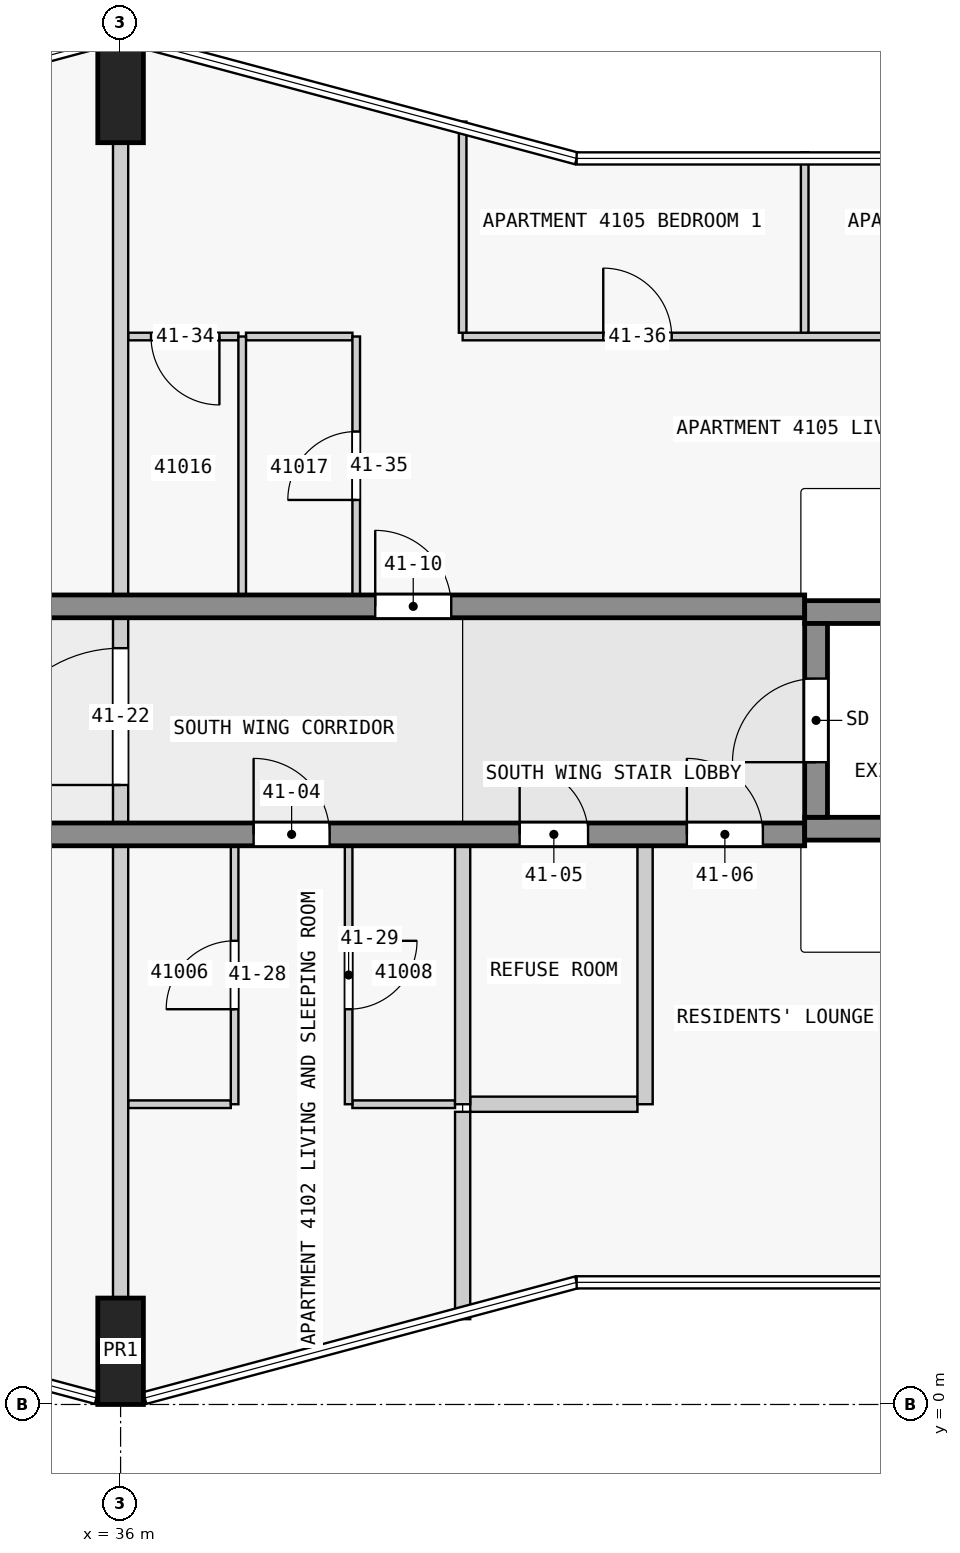
"""IFC4 building model, lengths in metres.
Left out: names, types, materials, properties, quantities, classifications, styles, units other than length and angle.
Written with IfcOpenShell. Run it as: python <this file> out.ifc"""

import sys

from ifc_helpers import new_model, si_unit, direction, frame, frame_2d, origin, origin_2d, place, context, subcontext, project, spatial, rectangle, extrude, element, fill, save


model = new_model("IFC4")
c1 = context("Model", 3, precision=1e-05, world=origin(), true_north=direction((0.0, 1.0)))
c2 = subcontext(c1, "Body", "Model", "MODEL_VIEW")
j1 = project(units=[si_unit("LENGTHUNIT", "METRE"), si_unit("PLANEANGLEUNIT", "RADIAN")], contexts=[c1])
p1 = place(None, origin())
s1 = spatial("IfcSite", under=j1, at=p1, CompositionType="ELEMENT")
p2 = place(p1, origin())
s2 = spatial("IfcBuilding", under=s1, at=p2, CompositionType="ELEMENT")
p3 = place(p2, frame((0.0, 0.0, 160.4)))
s3 = spatial("IfcBuildingStorey", under=s2, at=p3, CompositionType="ELEMENT", Elevation=160.4)
for number, where, z_axis, x_axis in (
    (1, (36.0, 0.7, 0.0), (0.0, 0.0, 1.0), (1.0, 0.0, 0.0)),
    (2, (36.0, 17.3, 0.0), (0.0, 0.0, 1.0), (1.0, 0.0, 0.0)),
):
    element("IfcColumn", number, at=place(p3, frame(where, z_axis=z_axis, x_axis=x_axis)), inside=s3, PredefinedType="COLUMN", context=c2, shape_type="SweptSolid", body=[
        extrude(rectangle(XDim=0.6, YDim=1.4, at=origin_2d()), origin(), (0.0, 0.0, 1.0), 3.5),
    ])
p4 = place(p3, frame((45.15, 7.725, 0.0), z_axis=(0.0, 0.0, 1.0), x_axis=(0.0, 1.0, 0.0)))
e3 = element("IfcWall", 3, at=p4, inside=s3, PredefinedType="SHEAR", context=c2, shape_type="SweptSolid", body=[
    extrude(rectangle(XDim=2.55, YDim=0.3, at=frame_2d((1.275, 0.0))), origin(), (0.0, 0.0, 1.0), 3.5),
])
p5 = place(p4, frame((0.725, 0.0, 0.0)))
e4 = element("IfcOpeningElement", 4, at=p5, cuts=e3, PredefinedType="OPENING", context=c2, shape_type="SweptSolid", body=[
    extrude(rectangle(XDim=1.1, YDim=2.1, at=frame_2d((0.55, 1.05))), frame((0.0, 0.16, 0.0), z_axis=(0.0, -1.0, 0.0), x_axis=(1.0, 0.0, 0.0)), (0.0, 0.0, 1.0), 0.32),
])
for number, where, z_axis, x_axis in (
    (5, (45.0, 7.575, 0.0), (0.0, 0.0, 1.0), (1.0, 0.0, 0.0)),
    (6, (45.0, 10.425, 0.0), (0.0, 0.0, 1.0), (1.0, 0.0, 0.0)),
):
    element("IfcWall", number, at=place(p3, frame(where, z_axis=z_axis, x_axis=x_axis)), inside=s3, PredefinedType="SHEAR", context=c2, shape_type="SweptSolid", body=[
        extrude(rectangle(XDim=7.2, YDim=0.3, at=frame_2d((3.6, 0.0))), origin(), (0.0, 0.0, 1.0), 3.5),
    ])
p6 = place(p3, frame((22.5, 7.5, 0.0), z_axis=(0.0, 0.0, 1.0), x_axis=(1.0, 0.0, 0.0)))
e7 = element("IfcWall", 7, at=p6, inside=s3, PredefinedType="SHEAR", context=c2, shape_type="SweptSolid", body=[
    extrude(rectangle(XDim=22.5, YDim=0.3, at=frame_2d((11.25, 0.0))), origin(), (0.0, 0.0, 1.0), 3.25),
])
p7 = place(p6, frame((1.75, 0.0, 0.0)))
e8 = element("IfcOpeningElement", 8, at=p7, cuts=e7, PredefinedType="OPENING", context=c2, shape_type="SweptSolid", body=[
    extrude(rectangle(XDim=1.0, YDim=2.1, at=frame_2d((0.5, 1.05))), frame((0.0, 0.16, 0.0), z_axis=(0.0, -1.0, 0.0), x_axis=(1.0, 0.0, 0.0)), (0.0, 0.0, 1.0), 0.32),
])
p8 = place(p6, frame((6.25, 0.0, 0.0)))
e9 = element("IfcOpeningElement", 9, at=p8, cuts=e7, PredefinedType="OPENING", context=c2, shape_type="SweptSolid", body=[
    extrude(rectangle(XDim=1.0, YDim=2.1, at=frame_2d((0.5, 1.05))), frame((0.0, 0.16, 0.0), z_axis=(0.0, -1.0, 0.0), x_axis=(1.0, 0.0, 0.0)), (0.0, 0.0, 1.0), 0.32),
])
p9 = place(p6, frame((10.75, 0.0, 0.0)))
e10 = element("IfcOpeningElement", 10, at=p9, cuts=e7, PredefinedType="OPENING", context=c2, shape_type="SweptSolid", body=[
    extrude(rectangle(XDim=1.0, YDim=2.1, at=frame_2d((0.5, 1.05))), frame((0.0, 0.16, 0.0), z_axis=(0.0, -1.0, 0.0), x_axis=(1.0, 0.0, 0.0)), (0.0, 0.0, 1.0), 0.32),
])
p10 = place(p6, frame((15.25, 0.0, 0.0)))
e11 = element("IfcOpeningElement", 11, at=p10, cuts=e7, PredefinedType="OPENING", context=c2, shape_type="SweptSolid", body=[
    extrude(rectangle(XDim=1.0, YDim=2.1, at=frame_2d((0.5, 1.05))), frame((0.0, 0.16, 0.0), z_axis=(0.0, -1.0, 0.0), x_axis=(1.0, 0.0, 0.0)), (0.0, 0.0, 1.0), 0.32),
])
p11 = place(p6, frame((18.75, 0.0, 0.0)))
e12 = element("IfcOpeningElement", 12, at=p11, cuts=e7, PredefinedType="OPENING", context=c2, shape_type="SweptSolid", body=[
    extrude(rectangle(XDim=0.9, YDim=2.1, at=frame_2d((0.45, 1.05))), frame((0.0, 0.16, 0.0), z_axis=(0.0, -1.0, 0.0), x_axis=(1.0, 0.0, 0.0)), (0.0, 0.0, 1.0), 0.32),
])
p12 = place(p6, frame((20.95, 0.0, 0.0)))
e13 = element("IfcOpeningElement", 13, at=p12, cuts=e7, PredefinedType="OPENING", context=c2, shape_type="SweptSolid", body=[
    extrude(rectangle(XDim=1.0, YDim=2.1, at=frame_2d((0.5, 1.05))), frame((0.0, 0.16, 0.0), z_axis=(0.0, -1.0, 0.0), x_axis=(1.0, 0.0, 0.0)), (0.0, 0.0, 1.0), 0.32),
])
p13 = place(p3, frame((22.5, 10.5, 0.0), z_axis=(0.0, 0.0, 1.0), x_axis=(1.0, 0.0, 0.0)))
e14 = element("IfcWall", 14, at=p13, inside=s3, PredefinedType="SHEAR", context=c2, shape_type="SweptSolid", body=[
    extrude(rectangle(XDim=22.5, YDim=0.3, at=frame_2d((11.25, 0.0))), origin(), (0.0, 0.0, 1.0), 3.25),
])
p14 = place(p13, frame((1.75, 0.0, 0.0)))
e15 = element("IfcOpeningElement", 15, at=p14, cuts=e14, PredefinedType="OPENING", context=c2, shape_type="SweptSolid", body=[
    extrude(rectangle(XDim=1.0, YDim=2.1, at=frame_2d((0.5, 1.05))), frame((0.0, 0.16, 0.0), z_axis=(0.0, -1.0, 0.0), x_axis=(1.0, 0.0, 0.0)), (0.0, 0.0, 1.0), 0.32),
])
p15 = place(p13, frame((6.25, 0.0, 0.0)))
e16 = element("IfcOpeningElement", 16, at=p15, cuts=e14, PredefinedType="OPENING", context=c2, shape_type="SweptSolid", body=[
    extrude(rectangle(XDim=1.0, YDim=2.1, at=frame_2d((0.5, 1.05))), frame((0.0, 0.16, 0.0), z_axis=(0.0, -1.0, 0.0), x_axis=(1.0, 0.0, 0.0)), (0.0, 0.0, 1.0), 0.32),
])
p16 = place(p13, frame((10.35, 0.0, 0.0)))
e17 = element("IfcOpeningElement", 17, at=p16, cuts=e14, PredefinedType="OPENING", context=c2, shape_type="SweptSolid", body=[
    extrude(rectangle(XDim=1.8, YDim=2.1, at=frame_2d((0.9, 1.05))), frame((0.0, 0.16, 0.0), z_axis=(0.0, -1.0, 0.0), x_axis=(1.0, 0.0, 0.0)), (0.0, 0.0, 1.0), 0.32),
])
p17 = place(p13, frame((16.85, 0.0, 0.0)))
e18 = element("IfcOpeningElement", 18, at=p17, cuts=e14, PredefinedType="OPENING", context=c2, shape_type="SweptSolid", body=[
    extrude(rectangle(XDim=1.0, YDim=2.1, at=frame_2d((0.5, 1.05))), frame((0.0, 0.16, 0.0), z_axis=(0.0, -1.0, 0.0), x_axis=(1.0, 0.0, 0.0)), (0.0, 0.0, 1.0), 0.32),
])
for number, where, z_axis, x_axis in (
    (19, (36.1, 3.95, 0.0), (0.0, 0.0, 1.0), (1.0, 0.0, 0.0)),
    (20, (39.05, 3.95, 0.0), (0.0, 0.0, 1.0), (1.0, 0.0, 0.0)),
):
    element("IfcWall", number, at=place(p3, frame(where, z_axis=z_axis, x_axis=x_axis)), inside=s3, PredefinedType="PARTITIONING", context=c2, shape_type="SweptSolid", body=[
        extrude(rectangle(XDim=1.35, YDim=0.1, at=frame_2d((0.675, 0.0))), origin(), (0.0, 0.0, 1.0), 3.25),
    ])
p18 = place(p3, frame((40.6, 3.95, 0.0), z_axis=(0.0, 0.0, 1.0), x_axis=(1.0, 0.0, 0.0)))
e21 = element("IfcWall", 21, at=p18, inside=s3, PredefinedType="PARTITIONING", context=c2, shape_type="SweptSolid", body=[
    extrude(rectangle(XDim=2.2, YDim=0.2, at=frame_2d((1.1, 0.0))), origin(), (0.0, 0.0, 1.0), 3.25),
])
p19 = place(p3, frame((37.55, 14.05, 0.0), z_axis=(0.0, 0.0, 1.0), x_axis=(-1.0, 0.0, 0.0)))
e22 = element("IfcWall", 22, at=p19, inside=s3, PredefinedType="PARTITIONING", context=c2, shape_type="SweptSolid", body=[
    extrude(rectangle(XDim=1.45, YDim=0.1, at=frame_2d((0.725, 0.0))), origin(), (0.0, 0.0, 1.0), 3.25),
])
p20 = place(p19, frame((0.25, 0.0, 0.0)))
e23 = element("IfcOpeningElement", 23, at=p20, cuts=e22, PredefinedType="OPENING", context=c2, shape_type="SweptSolid", body=[
    extrude(rectangle(XDim=0.9, YDim=2.1, at=frame_2d((0.45, 1.05))), frame((0.0, 0.06, 0.0), z_axis=(0.0, -1.0, 0.0), x_axis=(1.0, 0.0, 0.0)), (0.0, 0.0, 1.0), 0.12),
])
p21 = place(p3, frame((39.05, 14.05, 0.0), z_axis=(0.0, 0.0, 1.0), x_axis=(-1.0, 0.0, 0.0)))
e24 = element("IfcWall", 24, at=p21, inside=s3, PredefinedType="PARTITIONING", context=c2, shape_type="SweptSolid", body=[
    extrude(rectangle(XDim=1.4, YDim=0.1, at=frame_2d((0.7, 0.0))), origin(), (0.0, 0.0, 1.0), 3.25),
])
p22 = place(p3, frame((40.5, 14.05, 0.0), z_axis=(0.0, 0.0, 1.0), x_axis=(1.0, 0.0, 0.0)))
e25 = element("IfcWall", 25, at=p22, inside=s3, PredefinedType="PARTITIONING", context=c2, shape_type="SweptSolid", body=[
    extrude(rectangle(XDim=13.58, YDim=0.1, at=frame_2d((6.79, 0.0))), origin(), (0.0, 0.0, 1.0), 3.25),
])
p23 = place(p22, frame((1.85, 0.0, 0.0)))
e26 = element("IfcOpeningElement", 26, at=p23, cuts=e25, PredefinedType="OPENING", context=c2, shape_type="SweptSolid", body=[
    extrude(rectangle(XDim=0.9, YDim=2.1, at=frame_2d((0.45, 1.05))), frame((0.0, 0.06, 0.0), z_axis=(0.0, -1.0, 0.0), x_axis=(1.0, 0.0, 0.0)), (0.0, 0.0, 1.0), 0.12),
])
p24 = place(p22, frame((6.35, 0.0, 0.0)))
e27 = element("IfcOpeningElement", 27, at=p24, cuts=e25, PredefinedType="OPENING", context=c2, shape_type="SweptSolid", body=[
    extrude(rectangle(XDim=0.9, YDim=2.1, at=frame_2d((0.45, 1.05))), frame((0.0, 0.06, 0.0), z_axis=(0.0, -1.0, 0.0), x_axis=(1.0, 0.0, 0.0)), (0.0, 0.0, 1.0), 0.12),
])
p25 = place(p22, frame((10.65, 0.0, 0.0)))
e28 = element("IfcOpeningElement", 28, at=p25, cuts=e25, PredefinedType="OPENING", context=c2, shape_type="SweptSolid", body=[
    extrude(rectangle(XDim=0.9, YDim=2.1, at=frame_2d((0.45, 1.05))), frame((0.0, 0.06, 0.0), z_axis=(0.0, -1.0, 0.0), x_axis=(1.0, 0.0, 0.0)), (0.0, 0.0, 1.0), 0.12),
])
for number, where, z_axis, x_axis in (
    (29, (36.0, 1.4, 0.0), (0.0, 0.0, 1.0), (0.0, 1.0, 0.0)),
    (30, (36.0, 10.65, 0.0), (0.0, 0.0, 1.0), (0.0, 1.0, 0.0)),
):
    element("IfcWall", number, at=place(p3, frame(where, z_axis=z_axis, x_axis=x_axis)), inside=s3, PredefinedType="PARTITIONING", context=c2, shape_type="SweptSolid", body=[
        extrude(rectangle(XDim=5.95, YDim=0.2, at=frame_2d((2.975, 0.0))), origin(), (0.0, 0.0, 1.0), 3.25),
    ])
p26 = place(p3, frame((37.5, 3.95, 0.0), z_axis=(0.0, 0.0, 1.0), x_axis=(0.0, 1.0, 0.0)))
e31 = element("IfcWall", 31, at=p26, inside=s3, PredefinedType="PARTITIONING", context=c2, shape_type="SweptSolid", body=[
    extrude(rectangle(XDim=3.4, YDim=0.1, at=frame_2d((1.7, 0.0))), origin(), (0.0, 0.0, 1.0), 3.25),
])
p27 = place(p26, frame((1.25, 0.0, 0.0)))
e32 = element("IfcOpeningElement", 32, at=p27, cuts=e31, PredefinedType="OPENING", context=c2, shape_type="SweptSolid", body=[
    extrude(rectangle(XDim=0.9, YDim=2.1, at=frame_2d((0.45, 1.05))), frame((0.0, 0.06, 0.0), z_axis=(0.0, -1.0, 0.0), x_axis=(1.0, 0.0, 0.0)), (0.0, 0.0, 1.0), 0.12),
])
p28 = place(p3, frame((37.6, 10.65, 0.0), z_axis=(0.0, 0.0, 1.0), x_axis=(0.0, 1.0, 0.0)))
e33 = element("IfcWall", 33, at=p28, inside=s3, PredefinedType="PARTITIONING", context=c2, shape_type="SweptSolid", body=[
    extrude(rectangle(XDim=3.4, YDim=0.1, at=frame_2d((1.7, 0.0))), origin(), (0.0, 0.0, 1.0), 3.25),
])
p29 = place(p3, frame((39.0, 7.35, 0.0), z_axis=(0.0, 0.0, 1.0), x_axis=(0.0, -1.0, 0.0)))
e34 = element("IfcWall", 34, at=p29, inside=s3, PredefinedType="PARTITIONING", context=c2, shape_type="SweptSolid", body=[
    extrude(rectangle(XDim=3.4, YDim=0.1, at=frame_2d((1.7, 0.0))), origin(), (0.0, 0.0, 1.0), 3.25),
])
p30 = place(p29, frame((1.25, 0.0, 0.0)))
e35 = element("IfcOpeningElement", 35, at=p30, cuts=e34, PredefinedType="OPENING", context=c2, shape_type="SweptSolid", body=[
    extrude(rectangle(XDim=0.9, YDim=2.1, at=frame_2d((0.45, 1.05))), frame((0.0, 0.06, 0.0), z_axis=(0.0, -1.0, 0.0), x_axis=(1.0, 0.0, 0.0)), (0.0, 0.0, 1.0), 0.12),
])
p31 = place(p3, frame((39.1, 10.65, 0.0), z_axis=(0.0, 0.0, 1.0), x_axis=(0.0, 1.0, 0.0)))
e36 = element("IfcWall", 36, at=p31, inside=s3, PredefinedType="PARTITIONING", context=c2, shape_type="SweptSolid", body=[
    extrude(rectangle(XDim=3.4, YDim=0.1, at=frame_2d((1.7, 0.0))), origin(), (0.0, 0.0, 1.0), 3.25),
])
p32 = place(p31, frame((1.25, 0.0, 0.0)))
e37 = element("IfcOpeningElement", 37, at=p32, cuts=e36, PredefinedType="OPENING", context=c2, shape_type="SweptSolid", body=[
    extrude(rectangle(XDim=0.9, YDim=2.1, at=frame_2d((0.45, 1.05))), frame((0.0, 0.06, 0.0), z_axis=(0.0, -1.0, 0.0), x_axis=(1.0, 0.0, 0.0)), (0.0, 0.0, 1.0), 0.12),
])
p33 = place(p3, frame((40.5, 16.878, 0.0), z_axis=(0.0, 0.0, 1.0), x_axis=(0.0, -1.0, 0.0)))
e38 = element("IfcWall", 38, at=p33, inside=s3, PredefinedType="PARTITIONING", context=c2, shape_type="SweptSolid", body=[
    extrude(rectangle(XDim=2.778, YDim=0.1, at=frame_2d((1.389, 0.0))), origin(), (0.0, 0.0, 1.0), 3.25),
])
p34 = place(p3, frame((40.5, 3.85, 0.0), z_axis=(0.0, 0.0, 1.0), x_axis=(0.0, -1.0, 0.0)))
e39 = element("IfcWall", 39, at=p34, inside=s3, PredefinedType="PARTITIONING", context=c2, shape_type="SweptSolid", body=[
    extrude(rectangle(XDim=2.728, YDim=0.2, at=frame_2d((1.364, 0.0))), origin(), (0.0, 0.0, 1.0), 3.25),
])
for number, where, z_axis, x_axis in (
    (40, (40.5, 3.95, 0.0), (0.0, 0.0, 1.0), (0.0, 1.0, 0.0)),
    (41, (42.9, 3.95, 0.0), (0.0, 0.0, 1.0), (0.0, 1.0, 0.0)),
):
    element("IfcWall", number, at=place(p3, frame(where, z_axis=z_axis, x_axis=x_axis)), inside=s3, PredefinedType="PARTITIONING", context=c2, shape_type="SweptSolid", body=[
        extrude(rectangle(XDim=3.4, YDim=0.2, at=frame_2d((1.7, 0.0))), origin(), (0.0, 0.0, 1.0), 3.25),
    ])
p35 = place(p3, frame((45.0, 14.1, 0.0), z_axis=(0.0, 0.0, 1.0), x_axis=(0.0, 1.0, 0.0)))
e42 = element("IfcWall", 42, at=p35, inside=s3, PredefinedType="PARTITIONING", context=c2, shape_type="SweptSolid", body=[
    extrude(rectangle(XDim=2.373, YDim=0.1, at=frame_2d((1.187, 0.0))), origin(), (0.0, 0.0, 1.0), 3.25),
])
p36 = place(p3, frame((36.0, 7.45, 0.0), z_axis=(0.0, 0.0, 1.0), x_axis=(0.0, 1.0, 0.0)))
e43 = element("IfcWall", 43, at=p36, inside=s3, PredefinedType="PARTITIONING", context=c2, shape_type="SweptSolid", body=[
    extrude(rectangle(XDim=3.1, YDim=0.2, at=frame_2d((1.55, 0.0))), origin(), (0.0, 0.0, 1.0), 3.25),
])
p37 = place(p36, frame((0.7, 0.0, 0.0)))
e44 = element("IfcOpeningElement", 44, at=p37, cuts=e43, PredefinedType="OPENING", context=c2, shape_type="SweptSolid", body=[
    extrude(rectangle(XDim=1.8, YDim=2.1, at=frame_2d((0.9, 1.05))), frame((0.0, 0.11, 0.0), z_axis=(0.0, -1.0, 0.0), x_axis=(1.0, 0.0, 0.0)), (0.0, 0.0, 1.0), 0.22),
])
p38 = place(p5, origin())
e45 = element("IfcDoor", 45, at=p38, inside=s3, OperationType="SINGLE_SWING_LEFT", PredefinedType="DOOR", context=c2, shape_type="SweptSolid", body=[
    extrude(rectangle(XDim=1.1, YDim=2.1, at=frame_2d((0.55, 1.05))), frame((0.0, 0.025, 0.0), z_axis=(0.0, -1.0, 0.0), x_axis=(1.0, 0.0, 0.0)), (0.0, 0.0, 1.0), 0.05),
])
fill(e4, e45)
p39 = place(p10, origin())
e46 = element("IfcDoor", 46, at=p39, inside=s3, OperationType="SINGLE_SWING_RIGHT", PredefinedType="DOOR", context=c2, shape_type="SweptSolid", body=[
    extrude(rectangle(XDim=1.0, YDim=2.1, at=frame_2d((0.5, 1.05))), frame((0.0, 0.025, 0.0), z_axis=(0.0, -1.0, 0.0), x_axis=(1.0, 0.0, 0.0)), (0.0, 0.0, 1.0), 0.05),
])
fill(e11, e46)
p40 = place(p11, origin())
e47 = element("IfcDoor", 47, at=p40, inside=s3, OperationType="SINGLE_SWING_RIGHT", PredefinedType="DOOR", context=c2, shape_type="SweptSolid", body=[
    extrude(rectangle(XDim=0.9, YDim=2.1, at=frame_2d((0.45, 1.05))), frame((0.0, 0.025, 0.0), z_axis=(0.0, -1.0, 0.0), x_axis=(1.0, 0.0, 0.0)), (0.0, 0.0, 1.0), 0.05),
])
fill(e12, e47)
p41 = place(p12, origin())
e48 = element("IfcDoor", 48, at=p41, inside=s3, OperationType="SINGLE_SWING_RIGHT", PredefinedType="DOOR", context=c2, shape_type="SweptSolid", body=[
    extrude(rectangle(XDim=1.0, YDim=2.1, at=frame_2d((0.5, 1.05))), frame((0.0, 0.025, 0.0), z_axis=(0.0, -1.0, 0.0), x_axis=(1.0, 0.0, 0.0)), (0.0, 0.0, 1.0), 0.05),
])
fill(e13, e48)
p42 = place(p17, origin())
e49 = element("IfcDoor", 49, at=p42, inside=s3, OperationType="SINGLE_SWING_RIGHT", PredefinedType="DOOR", context=c2, shape_type="SweptSolid", body=[
    extrude(rectangle(XDim=1.0, YDim=2.1, at=frame_2d((0.5, 1.05))), frame((0.0, 0.025, 0.0), z_axis=(0.0, -1.0, 0.0), x_axis=(1.0, 0.0, 0.0)), (0.0, 0.0, 1.0), 0.05),
])
fill(e18, e49)
p43 = place(p37, origin())
e50 = element("IfcDoor", 50, at=p43, inside=s3, OperationType="SINGLE_SWING_RIGHT", PredefinedType="DOOR", context=c2, shape_type="SweptSolid", body=[
    extrude(rectangle(XDim=1.8, YDim=2.1, at=frame_2d((0.9, 1.05))), frame((0.0, 0.025, 0.0), z_axis=(0.0, -1.0, 0.0), x_axis=(1.0, 0.0, 0.0)), (0.0, 0.0, 1.0), 0.05),
])
fill(e44, e50)
p44 = place(p27, origin())
e51 = element("IfcDoor", 51, at=p44, inside=s3, OperationType="SINGLE_SWING_RIGHT", PredefinedType="DOOR", context=c2, shape_type="SweptSolid", body=[
    extrude(rectangle(XDim=0.9, YDim=2.1, at=frame_2d((0.45, 1.05))), frame((0.0, 0.025, 0.0), z_axis=(0.0, -1.0, 0.0), x_axis=(1.0, 0.0, 0.0)), (0.0, 0.0, 1.0), 0.05),
])
fill(e32, e51)
p45 = place(p30, origin())
e52 = element("IfcDoor", 52, at=p45, inside=s3, OperationType="SINGLE_SWING_RIGHT", PredefinedType="DOOR", context=c2, shape_type="SweptSolid", body=[
    extrude(rectangle(XDim=0.9, YDim=2.1, at=frame_2d((0.45, 1.05))), frame((0.0, 0.025, 0.0), z_axis=(0.0, -1.0, 0.0), x_axis=(1.0, 0.0, 0.0)), (0.0, 0.0, 1.0), 0.05),
])
fill(e35, e52)
p46 = place(p20, origin())
e53 = element("IfcDoor", 53, at=p46, inside=s3, OperationType="SINGLE_SWING_LEFT", PredefinedType="DOOR", context=c2, shape_type="SweptSolid", body=[
    extrude(rectangle(XDim=0.9, YDim=2.1, at=frame_2d((0.45, 1.05))), frame((0.0, 0.025, 0.0), z_axis=(0.0, -1.0, 0.0), x_axis=(1.0, 0.0, 0.0)), (0.0, 0.0, 1.0), 0.05),
])
fill(e23, e53)
p47 = place(p32, origin())
e54 = element("IfcDoor", 54, at=p47, inside=s3, OperationType="SINGLE_SWING_LEFT", PredefinedType="DOOR", context=c2, shape_type="SweptSolid", body=[
    extrude(rectangle(XDim=0.9, YDim=2.1, at=frame_2d((0.45, 1.05))), frame((0.0, 0.025, 0.0), z_axis=(0.0, -1.0, 0.0), x_axis=(1.0, 0.0, 0.0)), (0.0, 0.0, 1.0), 0.05),
])
fill(e37, e54)
p48 = place(p23, origin())
e55 = element("IfcDoor", 55, at=p48, inside=s3, OperationType="SINGLE_SWING_LEFT", PredefinedType="DOOR", context=c2, shape_type="SweptSolid", body=[
    extrude(rectangle(XDim=0.9, YDim=2.1, at=frame_2d((0.45, 1.05))), frame((0.0, 0.025, 0.0), z_axis=(0.0, -1.0, 0.0), x_axis=(1.0, 0.0, 0.0)), (0.0, 0.0, 1.0), 0.05),
])
fill(e26, e55)
save(model, sys.argv[1])
